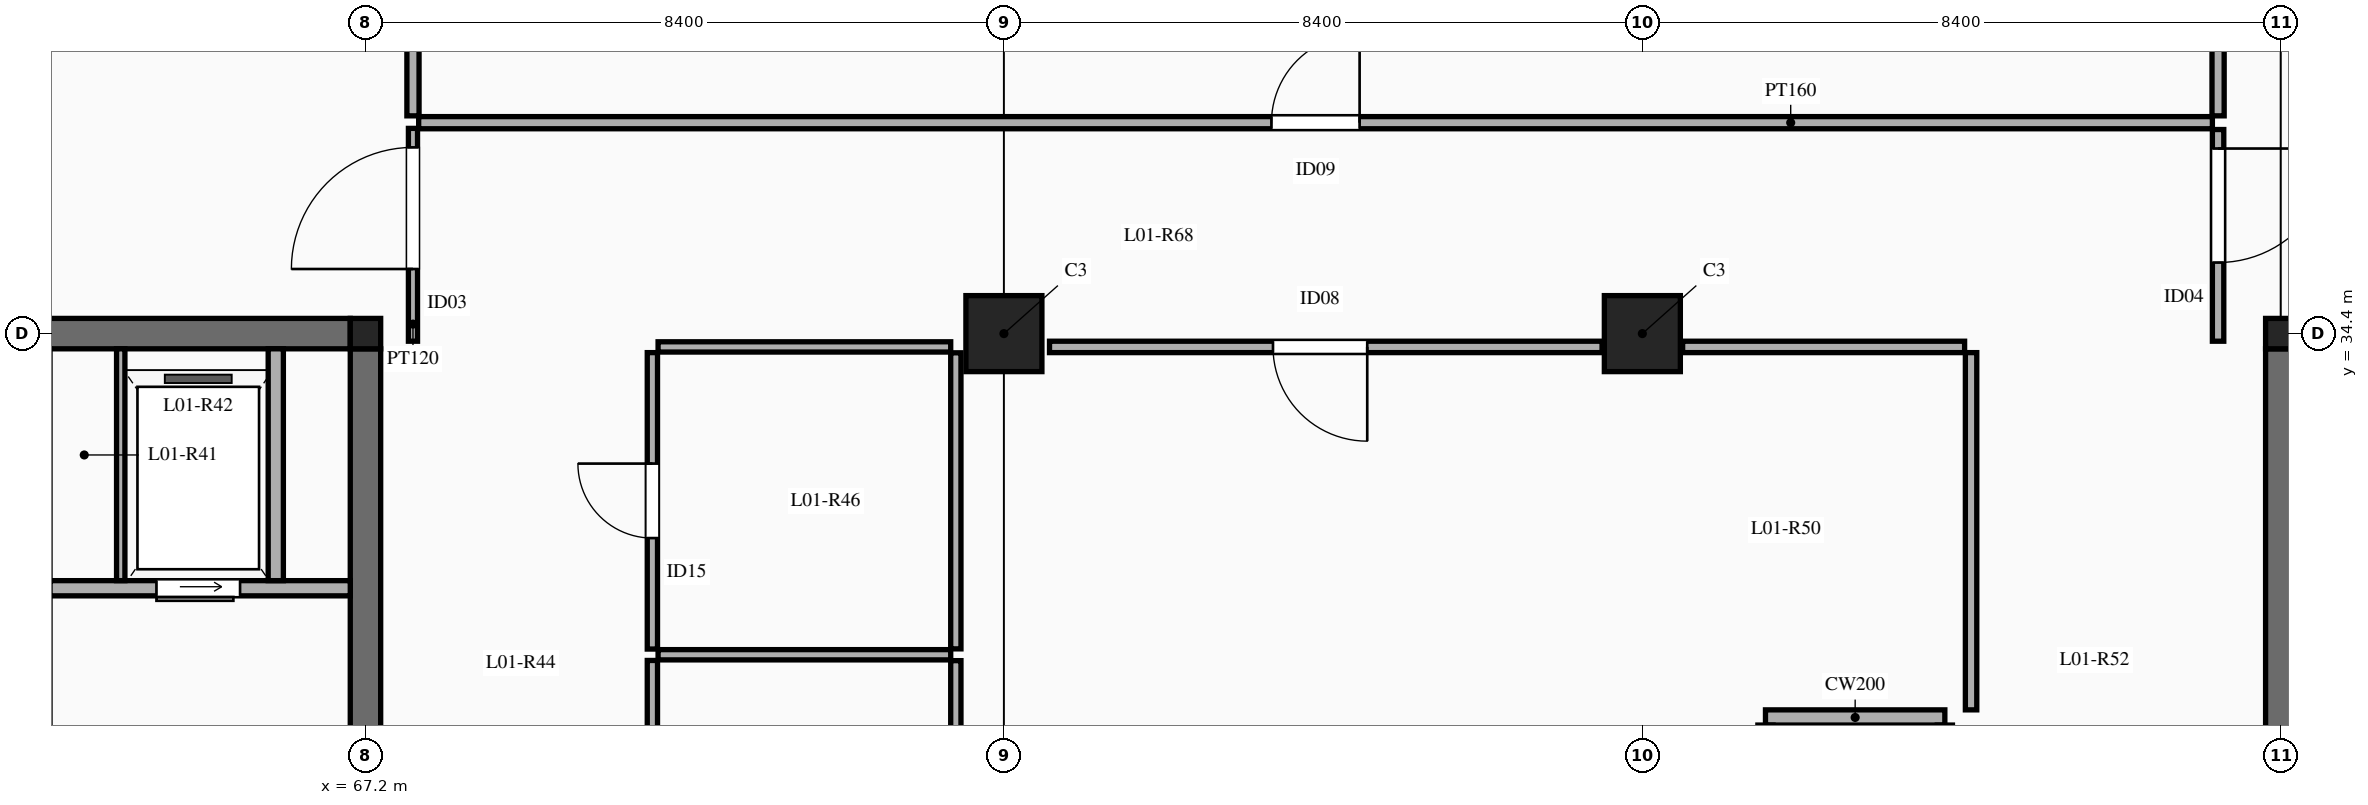
"""IFC4 building model, lengths in metres.
Left out: names, types, materials, properties, quantities, classifications, styles, units other than length and angle.
Written with IfcOpenShell. Run it as: python <this file> out.ifc"""

import sys

from ifc_helpers import new_model, si_unit, direction, frame, frame_2d, origin, origin_2d, place, context, subcontext, project, spatial, rectangle, extrude, element, fill, save


model = new_model("IFC4")
c1 = context("Model", 3, precision=1e-05, world=origin(), true_north=direction((0.0, 1.0)))
c2 = subcontext(c1, "Body", "Model", "MODEL_VIEW")
j1 = project(units=[si_unit("LENGTHUNIT", "METRE"), si_unit("PLANEANGLEUNIT", "RADIAN")], contexts=[c1])
p1 = place(None, origin())
s1 = spatial("IfcSite", under=j1, at=p1, CompositionType="ELEMENT")
p2 = place(p1, origin())
s2 = spatial("IfcBuilding", under=s1, at=p2, CompositionType="ELEMENT")
p3 = place(p2, frame((0.0, 0.0, 5.4)))
s3 = spatial("IfcBuildingStorey", under=s2, at=p3, CompositionType="ELEMENT", Elevation=5.4)
p4 = place(p3, frame((67.2, 34.4, 0.0), z_axis=(0.0, 0.0, 1.0), x_axis=(1.0, 0.0, 0.0)))
e1 = element("IfcColumn", 1, at=p4, inside=s3, PredefinedType="COLUMN", context=c2, shape_type="SweptSolid", body=[
    extrude(rectangle(XDim=0.4, YDim=0.4, at=origin_2d()), origin(), (0.0, 0.0, 1.0), 4.8),
])
for number, where, z_axis, x_axis in (
    (2, (75.6, 34.4, 0.0), (0.0, 0.0, 1.0), (1.0, 0.0, 0.0)),
    (3, (84.0, 34.4, 0.0), (0.0, 0.0, 1.0), (1.0, 0.0, 0.0)),
):
    element("IfcColumn", number, at=place(p3, frame(where, z_axis=z_axis, x_axis=x_axis)), inside=s3, PredefinedType="COLUMN", context=c2, shape_type="SweptSolid", body=[
        extrude(rectangle(XDim=1.0, YDim=1.0, at=origin_2d()), origin(), (0.0, 0.0, 1.0), 4.8),
    ])
p5 = place(p3, frame((92.4, 34.4, 0.0), z_axis=(0.0, 0.0, 1.0), x_axis=(1.0, 0.0, 0.0)))
e4 = element("IfcColumn", 4, at=p5, inside=s3, PredefinedType="COLUMN", context=c2, shape_type="SweptSolid", body=[
    extrude(rectangle(XDim=0.4, YDim=0.4, at=origin_2d()), origin(), (0.0, 0.0, 1.0), 4.8),
])
for number, where, z_axis, x_axis in (
    (5, (67.2, 26.2, 0.0), (0.0, 0.0, 1.0), (0.0, 1.0, 0.0)),
    (6, (59.0, 34.4, 0.0), (0.0, 0.0, 1.0), (1.0, 0.0, 0.0)),
    (7, (92.4, 26.2, 0.0), (0.0, 0.0, 1.0), (0.0, 1.0, 0.0)),
):
    element("IfcWall", number, at=place(p3, frame(where, z_axis=z_axis, x_axis=x_axis)), inside=s3, PredefinedType="SHEAR", context=c2, shape_type="SweptSolid", body=[
        extrude(rectangle(XDim=8.0, YDim=0.4, at=frame_2d((4.0, 0.0))), origin(), (0.0, 0.0, 1.0), 4.8),
    ])
p6 = place(p3, frame((63.05, 31.05, 0.0), z_axis=(0.0, 0.0, 1.0), x_axis=(1.0, 0.0, 0.0)))
e8 = element("IfcWall", 8, at=p6, inside=s3, PredefinedType="SOLIDWALL", context=c2, shape_type="SweptSolid", body=[
    extrude(rectangle(XDim=3.95, YDim=0.2, at=frame_2d((1.975, 0.0))), origin(), (0.0, 0.0, 1.0), 4.58),
])
p7 = place(p6, frame((1.4, 0.0, 0.0)))
e9 = element("IfcOpeningElement", 9, at=p7, cuts=e8, PredefinedType="OPENING", context=c2, shape_type="SweptSolid", body=[
    extrude(rectangle(XDim=1.1, YDim=2.15, at=frame_2d((0.55, 1.075))), frame((0.0, 0.11, 0.0), z_axis=(0.0, -1.0, 0.0), x_axis=(1.0, 0.0, 0.0)), (0.0, 0.0, 1.0), 0.22),
])
p8 = place(p3, frame((63.98, 31.15, 0.0), z_axis=(0.0, 0.0, 1.0), x_axis=(0.0, 1.0, 0.0)))
e10 = element("IfcWall", 10, at=p8, inside=s3, PredefinedType="PARTITIONING", context=c2, shape_type="SweptSolid", body=[
    extrude(rectangle(XDim=3.05, YDim=0.11, at=frame_2d((1.525, 0.0))), origin(), (0.0, 0.0, 1.0), 4.58),
])
p9 = place(p3, frame((66.02, 31.15, 0.0), z_axis=(0.0, 0.0, 1.0), x_axis=(0.0, 1.0, 0.0)))
e11 = element("IfcWall", 11, at=p9, inside=s3, PredefinedType="SOLIDWALL", context=c2, shape_type="SweptSolid", body=[
    extrude(rectangle(XDim=3.05, YDim=0.2, at=frame_2d((1.525, 0.0))), origin(), (0.0, 0.0, 1.0), 4.58),
])
p10 = place(p3, frame((85.62, 29.35, 0.0), z_axis=(0.0, 0.0, 1.0), x_axis=(1.0, 0.0, 0.0)))
e12 = element("IfcWall", 12, at=p10, inside=s3, PredefinedType="SOLIDWALL", context=c2, shape_type="SweptSolid", body=[
    extrude(rectangle(XDim=2.36, YDim=0.2, at=frame_2d((1.18, 0.0))), origin(), (0.0, 0.0, 1.0), 4.58),
])
p11 = place(p3, frame((70.975, 26.15, 0.0), z_axis=(0.0, 0.0, 1.0), x_axis=(0.0, 1.0, 0.0)))
e13 = element("IfcWall", 13, at=p11, inside=s3, PredefinedType="PARTITIONING", context=c2, shape_type="SweptSolid", body=[
    extrude(rectangle(XDim=3.95, YDim=0.135, at=frame_2d((1.975, 0.0))), origin(), (0.0, 0.0, 1.0), 2.95),
])
p12 = place(p11, frame((1.441, 0.0, 0.0)))
e14 = element("IfcOpeningElement", 14, at=p12, cuts=e13, PredefinedType="OPENING", context=c2, shape_type="SweptSolid", body=[
    extrude(rectangle(XDim=0.92, YDim=2.12, at=frame_2d((0.46, 1.06))), frame((0.0, 0.077, 0.0), z_axis=(0.0, -1.0, 0.0), x_axis=(1.0, 0.0, 0.0)), (0.0, 0.0, 1.0), 0.155),
])
p13 = place(p3, frame((70.975, 30.25, 0.0), z_axis=(0.0, 0.0, 1.0), x_axis=(0.0, 1.0, 0.0)))
e15 = element("IfcWall", 15, at=p13, inside=s3, PredefinedType="PARTITIONING", context=c2, shape_type="SweptSolid", body=[
    extrude(rectangle(XDim=3.9, YDim=0.135, at=frame_2d((1.95, 0.0))), origin(), (0.0, 0.0, 1.0), 2.95),
])
p14 = place(p13, frame((1.46, 0.0, 0.0)))
e16 = element("IfcOpeningElement", 16, at=p14, cuts=e15, PredefinedType="OPENING", context=c2, shape_type="SweptSolid", body=[
    extrude(rectangle(XDim=0.98, YDim=2.15, at=frame_2d((0.49, 1.075))), frame((0.0, 0.077, 0.0), z_axis=(0.0, -1.0, 0.0), x_axis=(1.0, 0.0, 0.0)), (0.0, 0.0, 1.0), 0.155),
])
for number, where, z_axis, x_axis in (
    (17, (71.05, 30.175, 0.0), (0.0, 0.0, 1.0), (1.0, 0.0, 0.0)),
    (18, (71.05, 34.225, 0.0), (0.0, 0.0, 1.0), (1.0, 0.0, 0.0)),
):
    element("IfcWall", number, at=place(p3, frame(where, z_axis=z_axis, x_axis=x_axis)), inside=s3, PredefinedType="PARTITIONING", context=c2, shape_type="SweptSolid", body=[
        extrude(rectangle(XDim=3.85, YDim=0.135, at=frame_2d((1.925, 0.0))), origin(), (0.0, 0.0, 1.0), 2.95),
    ])
p15 = place(p3, frame((88.325, 29.45, 0.0), z_axis=(0.0, 0.0, 1.0), x_axis=(0.0, 1.0, 0.0)))
e19 = element("IfcWall", 19, at=p15, inside=s3, PredefinedType="PARTITIONING", context=c2, shape_type="SweptSolid", body=[
    extrude(rectangle(XDim=4.7, YDim=0.15, at=frame_2d((2.35, 0.0))), origin(), (0.0, 0.0, 1.0), 2.95),
])
p16 = place(p3, frame((76.2, 34.225, 0.0), z_axis=(0.0, 0.0, 1.0), x_axis=(1.0, 0.0, 0.0)))
e20 = element("IfcWall", 20, at=p16, inside=s3, PredefinedType="PARTITIONING", context=c2, shape_type="SweptSolid", body=[
    extrude(rectangle(XDim=7.27, YDim=0.15, at=frame_2d((3.635, 0.0))), origin(), (0.0, 0.0, 1.0), 2.95),
])
p17 = place(p16, frame((2.94, 0.0, 0.0)))
e21 = element("IfcOpeningElement", 21, at=p17, cuts=e20, PredefinedType="OPENING", context=c2, shape_type="SweptSolid", body=[
    extrude(rectangle(XDim=1.24, YDim=2.2, at=frame_2d((0.62, 1.1))), frame((0.0, 0.085, 0.0), z_axis=(0.0, -1.0, 0.0), x_axis=(1.0, 0.0, 0.0)), (0.0, 0.0, 1.0), 0.17),
])
p18 = place(p3, frame((84.53, 34.225, 0.0), z_axis=(0.0, 0.0, 1.0), x_axis=(1.0, 0.0, 0.0)))
e22 = element("IfcWall", 22, at=p18, inside=s3, PredefinedType="PARTITIONING", context=c2, shape_type="SweptSolid", body=[
    extrude(rectangle(XDim=3.71, YDim=0.15, at=frame_2d((1.855, 0.0))), origin(), (0.0, 0.0, 1.0), 2.95),
])
p19 = place(p3, frame((67.825, 34.3, 0.0), z_axis=(0.0, 0.0, 1.0), x_axis=(0.0, 1.0, 0.0)))
e23 = element("IfcWall", 23, at=p19, inside=s3, PredefinedType="PARTITIONING", context=c2, shape_type="SweptSolid", body=[
    extrude(rectangle(XDim=2.8, YDim=0.12, at=frame_2d((1.4, 0.0))), origin(), (0.0, 0.0, 1.0), 2.95),
])
p20 = place(p19, frame((0.95, 0.0, 0.0)))
e24 = element("IfcOpeningElement", 24, at=p20, cuts=e23, PredefinedType="OPENING", context=c2, shape_type="SweptSolid", body=[
    extrude(rectangle(XDim=1.6, YDim=2.35, at=frame_2d((0.8, 1.175))), frame((0.0, 0.07, 0.0), z_axis=(0.0, -1.0, 0.0), x_axis=(1.0, 0.0, 0.0)), (0.0, 0.0, 1.0), 0.14),
])
p21 = place(p3, frame((67.9, 37.175, 0.0), z_axis=(0.0, 0.0, 1.0), x_axis=(1.0, 0.0, 0.0)))
e25 = element("IfcWall", 25, at=p21, inside=s3, PredefinedType="PARTITIONING", context=c2, shape_type="SweptSolid", body=[
    extrude(rectangle(XDim=23.6, YDim=0.16, at=frame_2d((11.8, 0.0))), origin(), (0.0, 0.0, 1.0), 2.95),
])
p22 = place(p21, frame((11.22, 0.0, 0.0)))
e26 = element("IfcOpeningElement", 26, at=p22, cuts=e25, PredefinedType="OPENING", context=c2, shape_type="SweptSolid", body=[
    extrude(rectangle(XDim=1.16, YDim=2.2, at=frame_2d((0.58, 1.1))), frame((0.0, 0.09, 0.0), z_axis=(0.0, -1.0, 0.0), x_axis=(1.0, 0.0, 0.0)), (0.0, 0.0, 1.0), 0.18),
])
p23 = place(p3, frame((91.575, 34.3, 0.0), z_axis=(0.0, 0.0, 1.0), x_axis=(0.0, 1.0, 0.0)))
e27 = element("IfcWall", 27, at=p23, inside=s3, PredefinedType="PARTITIONING", context=c2, shape_type="SweptSolid", body=[
    extrude(rectangle(XDim=2.785, YDim=0.15, at=frame_2d((1.393, 0.0))), origin(), (0.0, 0.0, 1.0), 2.95),
])
p24 = place(p23, frame((1.035, 0.0, 0.0)))
e28 = element("IfcOpeningElement", 28, at=p24, cuts=e27, PredefinedType="OPENING", context=c2, shape_type="SweptSolid", body=[
    extrude(rectangle(XDim=1.5, YDim=2.3, at=frame_2d((0.75, 1.15))), frame((0.0, 0.085, 0.0), z_axis=(0.0, -1.0, 0.0), x_axis=(1.0, 0.0, 0.0)), (0.0, 0.0, 1.0), 0.17),
])
for number, where, z_axis, x_axis in (
    (29, (67.825, 37.265, 0.0), (0.0, 0.0, 1.0), (0.0, 1.0, 0.0)),
    (30, (91.575, 37.265, 0.0), (0.0, 0.0, 1.0), (0.0, 1.0, 0.0)),
):
    element("IfcWall", number, at=place(p3, frame(where, z_axis=z_axis, x_axis=x_axis)), inside=s3, PredefinedType="PARTITIONING", context=c2, shape_type="SweptSolid", body=[
        extrude(rectangle(XDim=11.485, YDim=0.16, at=frame_2d((5.743, 0.0))), origin(), (0.0, 0.0, 1.0), 2.95),
    ])
p25 = place(p3, frame((74.968, 26.15, 0.0), z_axis=(0.0, 0.0, 1.0), x_axis=(0.0, 1.0, 0.0)))
e31 = element("IfcWall", 31, at=p25, inside=s3, PredefinedType="PARTITIONING", context=c2, shape_type="SweptSolid", body=[
    extrude(rectangle(XDim=3.948, YDim=0.135, at=frame_2d((1.974, 0.0))), origin(), (0.0, 0.0, 1.0), 2.95),
])
p26 = place(p3, frame((74.968, 30.252, 0.0), z_axis=(0.0, 0.0, 1.0), x_axis=(0.0, 1.0, 0.0)))
e32 = element("IfcWall", 32, at=p26, inside=s3, PredefinedType="PARTITIONING", context=c2, shape_type="SweptSolid", body=[
    extrude(rectangle(XDim=3.895, YDim=0.135, at=frame_2d((1.948, 0.0))), origin(), (0.0, 0.0, 1.0), 2.95),
])
p27 = place(p7, frame((1.1, 0.0, 0.0), z_axis=(0.0, 0.0, 1.0), x_axis=(-1.0, 0.0, 0.0)))
e33 = element("IfcDoor", 33, at=p27, inside=s3, OperationType="SLIDING_TO_LEFT", PredefinedType="DOOR", context=c2, shape_type="SweptSolid", body=[
    extrude(rectangle(XDim=1.1, YDim=2.15, at=frame_2d((0.55, 1.075))), frame((0.0, 0.025, 0.0), z_axis=(0.0, -1.0, 0.0), x_axis=(1.0, 0.0, 0.0)), (0.0, 0.0, 1.0), 0.05),
])
fill(e9, e33)
p28 = place(p14, origin())
e34 = element("IfcDoor", 34, at=p28, inside=s3, OperationType="SINGLE_SWING_RIGHT", PredefinedType="DOOR", context=c2, shape_type="SweptSolid", body=[
    extrude(rectangle(XDim=0.98, YDim=2.15, at=frame_2d((0.49, 1.075))), frame((0.0, 0.025, 0.0), z_axis=(0.0, -1.0, 0.0), x_axis=(1.0, 0.0, 0.0)), (0.0, 0.0, 1.0), 0.05),
])
fill(e16, e34)
p29 = place(p17, frame((1.24, 0.0, 0.0), z_axis=(0.0, 0.0, 1.0), x_axis=(-1.0, 0.0, 0.0)))
e35 = element("IfcDoor", 35, at=p29, inside=s3, OperationType="SINGLE_SWING_LEFT", PredefinedType="DOOR", context=c2, shape_type="SweptSolid", body=[
    extrude(rectangle(XDim=1.24, YDim=2.2, at=frame_2d((0.62, 1.1))), frame((0.0, 0.025, 0.0), z_axis=(0.0, -1.0, 0.0), x_axis=(1.0, 0.0, 0.0)), (0.0, 0.0, 1.0), 0.05),
])
fill(e21, e35)
p30 = place(p20, origin())
e36 = element("IfcDoor", 36, at=p30, inside=s3, OperationType="SINGLE_SWING_LEFT", PredefinedType="DOOR", context=c2, shape_type="SweptSolid", body=[
    extrude(rectangle(XDim=1.6, YDim=2.35, at=frame_2d((0.8, 1.175))), frame((0.0, 0.025, 0.0), z_axis=(0.0, -1.0, 0.0), x_axis=(1.0, 0.0, 0.0)), (0.0, 0.0, 1.0), 0.05),
])
fill(e24, e36)
p31 = place(p22, origin())
e37 = element("IfcDoor", 37, at=p31, inside=s3, OperationType="SINGLE_SWING_RIGHT", PredefinedType="DOOR", context=c2, shape_type="SweptSolid", body=[
    extrude(rectangle(XDim=1.16, YDim=2.2, at=frame_2d((0.58, 1.1))), frame((0.0, 0.025, 0.0), z_axis=(0.0, -1.0, 0.0), x_axis=(1.0, 0.0, 0.0)), (0.0, 0.0, 1.0), 0.05),
])
fill(e26, e37)
p32 = place(p24, frame((1.5, 0.0, 0.0), z_axis=(0.0, 0.0, 1.0), x_axis=(-1.0, 0.0, 0.0)))
e38 = element("IfcDoor", 38, at=p32, inside=s3, OperationType="SINGLE_SWING_LEFT", PredefinedType="DOOR", context=c2, shape_type="SweptSolid", body=[
    extrude(rectangle(XDim=1.5, YDim=2.3, at=frame_2d((0.75, 1.15))), frame((0.0, 0.025, 0.0), z_axis=(0.0, -1.0, 0.0), x_axis=(1.0, 0.0, 0.0)), (0.0, 0.0, 1.0), 0.05),
])
fill(e28, e38)
save(model, sys.argv[1])
